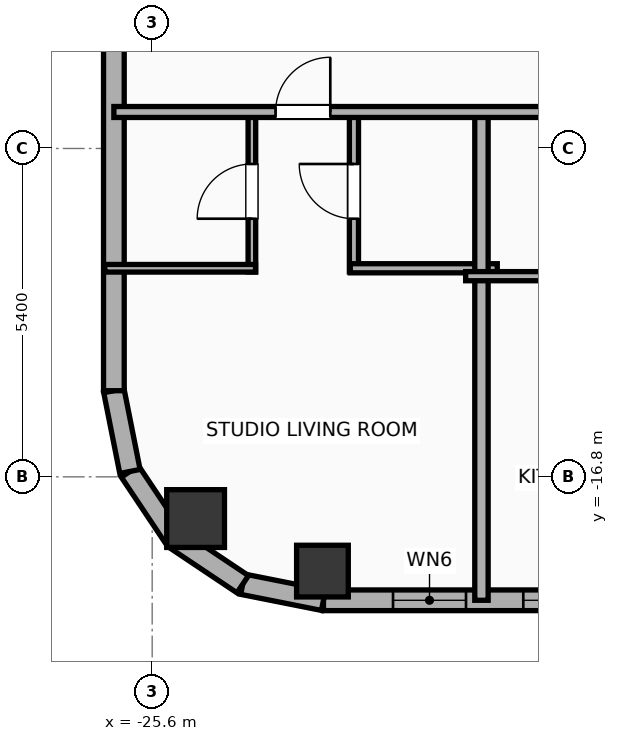
"""IFC4 building model, lengths in metres.
Left out: names, types, materials, properties, quantities, classifications, styles, units other than length and angle.
Written with IfcOpenShell. Run it as: python <this file> out.ifc"""

import sys

from ifc_helpers import new_model, si_unit, direction, frame, frame_2d, origin, origin_2d, place, context, subcontext, project, spatial, rectangle, hollow_rectangle, hollow_circle, extrude, element, fill, save


model = new_model("IFC4")
c1 = context("Model", 3, precision=1e-05, world=origin(), true_north=direction((0.0, 1.0)))
c2 = subcontext(c1, "Body", "Model", "MODEL_VIEW")
j1 = project(units=[si_unit("LENGTHUNIT", "METRE"), si_unit("PLANEANGLEUNIT", "RADIAN")], contexts=[c1])
p1 = place(None, origin())
s1 = spatial("IfcSite", under=j1, at=p1, CompositionType="ELEMENT")
p2 = place(p1, origin())
s2 = spatial("IfcBuilding", under=s1, at=p2, CompositionType="ELEMENT")
p3 = place(p2, frame((0.0, 0.0, 219.7)))
s3 = spatial("IfcBuildingStorey", under=s2, at=p3, CompositionType="ELEMENT", Elevation=219.7)
p4 = place(p3, frame((-22.8, -18.35, 0.0), z_axis=(0.0, 0.0, 1.0), x_axis=(1.0, 0.0, 0.0)))
e1 = element("IfcColumn", 1, at=p4, inside=s3, PredefinedType="COLUMN", context=c2, shape_type="SweptSolid", body=[
    extrude(hollow_rectangle(XDim=0.85, YDim=0.85, WallThickness=0.028, at=origin_2d()), origin(), (0.0, 0.0, 1.0), 3.9),
])
p5 = place(p3, frame((-24.886, -17.486, 0.0), z_axis=(0.0, 0.0, 1.0), x_axis=(1.0, 0.0, 0.0)))
e2 = element("IfcColumn", 2, at=p5, inside=s3, PredefinedType="COLUMN", context=c2, shape_type="SweptSolid", body=[
    extrude(hollow_circle(Radius=0.475, WallThickness=0.032, at=origin_2d()), origin(), (0.0, 0.0, 1.0), 3.9),
])
p6 = place(p3, frame((26.783, -18.83, 0.0), z_axis=(0.0, 0.0, 1.0), x_axis=(-1.0, 0.0, 0.0)))
e3 = element("IfcWall", 3, at=p6, inside=s3, PredefinedType="ELEMENTEDWALL", context=c2, shape_type="SweptSolid", body=[
    extrude(rectangle(XDim=49.566, YDim=0.34, at=frame_2d((24.783, 0.0))), origin(), (0.0, 0.0, 1.0), 3.65),
])
p7 = place(p6, frame((23.583, 0.0, 0.75)))
e4 = element("IfcOpeningElement", 4, at=p7, cuts=e3, PredefinedType="OPENING", context=c2, shape_type="SweptSolid", body=[
    extrude(rectangle(XDim=2.4, YDim=2.1, at=frame_2d((1.2, 1.05))), frame((0.0, 0.18, 0.0), z_axis=(0.0, -1.0, 0.0), x_axis=(1.0, 0.0, 0.0)), (0.0, 0.0, 1.0), 0.36),
])
p8 = place(p6, frame((41.756, 0.0, 0.75)))
e5 = element("IfcOpeningElement", 5, at=p8, cuts=e3, PredefinedType="OPENING", context=c2, shape_type="SweptSolid", body=[
    extrude(rectangle(XDim=2.4, YDim=2.1, at=frame_2d((1.2, 1.05))), frame((0.0, 0.18, 0.0), z_axis=(0.0, -1.0, 0.0), x_axis=(1.0, 0.0, 0.0)), (0.0, 0.0, 1.0), 0.36),
])
p9 = place(p6, frame((47.222, 0.0, 0.75)))
e6 = element("IfcOpeningElement", 6, at=p9, cuts=e3, PredefinedType="OPENING", context=c2, shape_type="SweptSolid", body=[
    extrude(rectangle(XDim=1.2, YDim=2.05, at=frame_2d((0.6, 1.025))), frame((0.0, 0.18, 0.0), z_axis=(0.0, -1.0, 0.0), x_axis=(1.0, 0.0, 0.0)), (0.0, 0.0, 1.0), 0.36),
])
p10 = place(p6, frame((45.08, 0.0, 0.75)))
e7 = element("IfcOpeningElement", 7, at=p10, cuts=e3, PredefinedType="OPENING", context=c2, shape_type="SweptSolid", body=[
    extrude(rectangle(XDim=1.2, YDim=2.05, at=frame_2d((0.6, 1.025))), frame((0.0, 0.18, 0.0), z_axis=(0.0, -1.0, 0.0), x_axis=(1.0, 0.0, 0.0)), (0.0, 0.0, 1.0), 0.36),
])
p11 = place(p6, frame((37.289, 0.0, 0.75)))
e8 = element("IfcOpeningElement", 8, at=p11, cuts=e3, PredefinedType="OPENING", context=c2, shape_type="SweptSolid", body=[
    extrude(rectangle(XDim=1.2, YDim=2.05, at=frame_2d((0.6, 1.025))), frame((0.0, 0.18, 0.0), z_axis=(0.0, -1.0, 0.0), x_axis=(1.0, 0.0, 0.0)), (0.0, 0.0, 1.0), 0.36),
])
p12 = place(p6, frame((16.115, 0.0, 0.75)))
e9 = element("IfcOpeningElement", 9, at=p12, cuts=e3, PredefinedType="OPENING", context=c2, shape_type="SweptSolid", body=[
    extrude(rectangle(XDim=1.2, YDim=2.05, at=frame_2d((0.6, 1.025))), frame((0.0, 0.18, 0.0), z_axis=(0.0, -1.0, 0.0), x_axis=(1.0, 0.0, 0.0)), (0.0, 0.0, 1.0), 0.36),
])
p13 = place(p6, frame((12.422, 0.0, 0.75)))
e10 = element("IfcOpeningElement", 10, at=p13, cuts=e3, PredefinedType="OPENING", context=c2, shape_type="SweptSolid", body=[
    extrude(rectangle(XDim=1.2, YDim=2.05, at=frame_2d((0.6, 1.025))), frame((0.0, 0.18, 0.0), z_axis=(0.0, -1.0, 0.0), x_axis=(1.0, 0.0, 0.0)), (0.0, 0.0, 1.0), 0.36),
])
p14 = place(p6, frame((8.09, 0.0, 0.75)))
e11 = element("IfcOpeningElement", 11, at=p14, cuts=e3, PredefinedType="OPENING", context=c2, shape_type="SweptSolid", body=[
    extrude(rectangle(XDim=1.2, YDim=2.05, at=frame_2d((0.6, 1.025))), frame((0.0, 0.18, 0.0), z_axis=(0.0, -1.0, 0.0), x_axis=(1.0, 0.0, 0.0)), (0.0, 0.0, 1.0), 0.36),
])
p15 = place(p6, frame((4.637, 0.0, 0.75)))
e12 = element("IfcOpeningElement", 12, at=p15, cuts=e3, PredefinedType="OPENING", context=c2, shape_type="SweptSolid", body=[
    extrude(rectangle(XDim=1.2, YDim=2.05, at=frame_2d((0.6, 1.025))), frame((0.0, 0.18, 0.0), z_axis=(0.0, -1.0, 0.0), x_axis=(1.0, 0.0, 0.0)), (0.0, 0.0, 1.0), 0.36),
])
p16 = place(p6, frame((1.811, 0.0, 0.75)))
e13 = element("IfcOpeningElement", 13, at=p16, cuts=e3, PredefinedType="OPENING", context=c2, shape_type="SweptSolid", body=[
    extrude(rectangle(XDim=1.2, YDim=2.05, at=frame_2d((0.6, 1.025))), frame((0.0, 0.18, 0.0), z_axis=(0.0, -1.0, 0.0), x_axis=(1.0, 0.0, 0.0)), (0.0, 0.0, 1.0), 0.36),
])
p17 = place(p6, frame((32.253, 0.0, 0.75)))
e14 = element("IfcOpeningElement", 14, at=p17, cuts=e3, PredefinedType="OPENING", context=c2, shape_type="SweptSolid", body=[
    extrude(rectangle(XDim=1.2, YDim=2.05, at=frame_2d((0.6, 1.025))), frame((0.0, 0.18, 0.0), z_axis=(0.0, -1.0, 0.0), x_axis=(1.0, 0.0, 0.0)), (0.0, 0.0, 1.0), 0.36),
])
p18 = place(p6, frame((27.853, 0.0, 0.75)))
e15 = element("IfcOpeningElement", 15, at=p18, cuts=e3, PredefinedType="OPENING", context=c2, shape_type="SweptSolid", body=[
    extrude(rectangle(XDim=1.2, YDim=2.05, at=frame_2d((0.6, 1.025))), frame((0.0, 0.18, 0.0), z_axis=(0.0, -1.0, 0.0), x_axis=(1.0, 0.0, 0.0)), (0.0, 0.0, 1.0), 0.36),
])
p19 = place(p6, frame((20.473, 0.0, 0.75)))
e16 = element("IfcOpeningElement", 16, at=p19, cuts=e3, PredefinedType="OPENING", context=c2, shape_type="SweptSolid", body=[
    extrude(rectangle(XDim=1.2, YDim=2.05, at=frame_2d((0.6, 1.025))), frame((0.0, 0.18, 0.0), z_axis=(0.0, -1.0, 0.0), x_axis=(1.0, 0.0, 0.0)), (0.0, 0.0, 1.0), 0.36),
])
p20 = place(p3, frame((-22.783, -18.83, 0.0), z_axis=(0.0, 0.0, 1.0), x_axis=(-0.980788153188, 0.195075878998, 0.0)))
e17 = element("IfcWall", 17, at=p20, inside=s3, PredefinedType="ELEMENTEDWALL", context=c2, shape_type="SweptSolid", body=[
    extrude(rectangle(XDim=1.354, YDim=0.34, at=frame_2d((0.677, 0.0))), origin(), (0.0, 0.0, 1.0), 3.65),
])
p21 = place(p3, frame((-24.111, -18.566, 0.0), z_axis=(0.0, 0.0, 1.0), x_axis=(-0.831403586725, 0.555669034571, 0.0)))
e18 = element("IfcWall", 18, at=p21, inside=s3, PredefinedType="ELEMENTEDWALL", context=c2, shape_type="SweptSolid", body=[
    extrude(rectangle(XDim=1.337, YDim=0.34, at=frame_2d((0.668, 0.0))), origin(), (0.0, 0.0, 1.0), 3.65),
])
p22 = place(p3, frame((-25.223, -17.823, 0.0), z_axis=(0.0, 0.0, 1.0), x_axis=(-0.555584683399, 0.831459956686, 0.0)))
e19 = element("IfcWall", 19, at=p22, inside=s3, PredefinedType="ELEMENTEDWALL", context=c2, shape_type="SweptSolid", body=[
    extrude(rectangle(XDim=1.337, YDim=0.34, at=frame_2d((0.668, 0.0))), origin(), (0.0, 0.0, 1.0), 3.65),
])
p23 = place(p3, frame((-25.966, -16.711, 0.0), z_axis=(0.0, 0.0, 1.0), x_axis=(-0.195110379894, 0.98078129043, 0.0)))
e20 = element("IfcWall", 20, at=p23, inside=s3, PredefinedType="ELEMENTEDWALL", context=c2, shape_type="SweptSolid", body=[
    extrude(rectangle(XDim=1.354, YDim=0.34, at=frame_2d((0.677, 0.0))), origin(), (0.0, 0.0, 1.0), 3.65),
])
p24 = place(p3, frame((-26.23, -15.383, 0.0), z_axis=(0.0, 0.0, 1.0), x_axis=(0.0, 1.0, 0.0)))
e21 = element("IfcWall", 21, at=p24, inside=s3, PredefinedType="ELEMENTEDWALL", context=c2, shape_type="SweptSolid", body=[
    extrude(rectangle(XDim=31.967, YDim=0.34, at=frame_2d((15.983, 0.0))), origin(), (0.0, 0.0, 1.0), 3.65),
])
p25 = place(p24, frame((29.55, 0.0, 0.75)))
e22 = element("IfcOpeningElement", 22, at=p25, cuts=e21, PredefinedType="OPENING", context=c2, shape_type="SweptSolid", body=[
    extrude(rectangle(XDim=1.2, YDim=2.05, at=frame_2d((0.6, 1.025))), frame((0.0, 0.18, 0.0), z_axis=(0.0, -1.0, 0.0), x_axis=(1.0, 0.0, 0.0)), (0.0, 0.0, 1.0), 0.36),
])
p26 = place(p24, frame((20.778, 0.0, 0.75)))
e23 = element("IfcOpeningElement", 23, at=p26, cuts=e21, PredefinedType="OPENING", context=c2, shape_type="SweptSolid", body=[
    extrude(rectangle(XDim=1.2, YDim=2.05, at=frame_2d((0.6, 1.025))), frame((0.0, 0.18, 0.0), z_axis=(0.0, -1.0, 0.0), x_axis=(1.0, 0.0, 0.0)), (0.0, 0.0, 1.0), 0.36),
])
p27 = place(p24, frame((7.323, 0.0, 0.75)))
e24 = element("IfcOpeningElement", 24, at=p27, cuts=e21, PredefinedType="OPENING", context=c2, shape_type="SweptSolid", body=[
    extrude(rectangle(XDim=1.2, YDim=2.05, at=frame_2d((0.6, 1.025))), frame((0.0, 0.18, 0.0), z_axis=(0.0, -1.0, 0.0), x_axis=(1.0, 0.0, 0.0)), (0.0, 0.0, 1.0), 0.36),
])
p28 = place(p3, frame((-23.96, -13.43, 0.0), z_axis=(0.0, 0.0, 1.0), x_axis=(0.0, 1.0, 0.0)))
e25 = element("IfcWall", 25, at=p28, inside=s3, PredefinedType="PARTITIONING", context=c2, shape_type="SweptSolid", body=[
    extrude(rectangle(XDim=2.65, YDim=0.125, at=frame_2d((1.325, 0.0))), origin(), (0.0, 0.0, 1.0), 3.65),
])
p29 = place(p28, frame((0.875, 0.0, 0.0)))
e26 = element("IfcOpeningElement", 26, at=p29, cuts=e25, PredefinedType="OPENING", context=c2, shape_type="SweptSolid", body=[
    extrude(rectangle(XDim=0.9, YDim=2.05, at=frame_2d((0.45, 1.025))), frame((0.0, 0.073, 0.0), z_axis=(0.0, -1.0, 0.0), x_axis=(1.0, 0.0, 0.0)), (0.0, 0.0, 1.0), 0.145),
])
p30 = place(p3, frame((-22.282, -13.43, 0.0), z_axis=(0.0, 0.0, 1.0), x_axis=(0.0, 1.0, 0.0)))
e27 = element("IfcWall", 27, at=p30, inside=s3, PredefinedType="PLUMBINGWALL", context=c2, shape_type="SweptSolid", body=[
    extrude(rectangle(XDim=2.65, YDim=0.15, at=frame_2d((1.325, 0.0))), origin(), (0.0, 0.0, 1.0), 3.65),
])
p31 = place(p30, frame((0.875, 0.0, 0.0)))
e28 = element("IfcOpeningElement", 28, at=p31, cuts=e27, PredefinedType="OPENING", context=c2, shape_type="SweptSolid", body=[
    extrude(rectangle(XDim=0.9, YDim=2.05, at=frame_2d((0.45, 1.025))), frame((0.0, 0.085, 0.0), z_axis=(0.0, -1.0, 0.0), x_axis=(1.0, 0.0, 0.0)), (0.0, 0.0, 1.0), 0.17),
])
p32 = place(p3, frame((-26.38, -13.37, 0.0), z_axis=(0.0, 0.0, 1.0), x_axis=(1.0, 0.0, 0.0)))
e29 = element("IfcWall", 29, at=p32, inside=s3, PredefinedType="PARTITIONING", context=c2, shape_type="SweptSolid", body=[
    extrude(rectangle(XDim=2.48, YDim=0.125, at=frame_2d((1.24, 0.0))), origin(), (0.0, 0.0, 1.0), 3.65),
])
p33 = place(p3, frame((-22.342, -13.37, 0.0), z_axis=(0.0, 0.0, 1.0), x_axis=(1.0, 0.0, 0.0)))
e30 = element("IfcWall", 30, at=p33, inside=s3, PredefinedType="PLUMBINGWALL", context=c2, shape_type="SweptSolid", body=[
    extrude(rectangle(XDim=2.417, YDim=0.15, at=frame_2d((1.208, 0.0))), origin(), (0.0, 0.0, 1.0), 3.65),
])
p34 = place(p3, frame((-20.185, -18.83, 0.0), z_axis=(0.0, 0.0, 1.0), x_axis=(0.0, 1.0, 0.0)))
e31 = element("IfcWall", 31, at=p34, inside=s3, PredefinedType="PARTITIONING", context=c2, shape_type="SweptSolid", body=[
    extrude(rectangle(XDim=8.11, YDim=0.22, at=frame_2d((4.055, 0.0))), origin(), (0.0, 0.0, 1.0), 3.09),
])
p35 = place(p3, frame((-20.445, -13.5, 0.0), z_axis=(0.0, 0.0, 1.0), x_axis=(1.0, 0.0, 0.0)))
e32 = element("IfcWall", 32, at=p35, inside=s3, PredefinedType="PLUMBINGWALL", context=c2, shape_type="SweptSolid", body=[
    extrude(rectangle(XDim=2.916, YDim=0.15, at=frame_2d((1.458, 0.0))), origin(), (0.0, 0.0, 1.0), 3.65),
])
p36 = place(p3, frame((-26.23, -10.8, 0.0), z_axis=(0.0, 0.0, 1.0), x_axis=(1.0, 0.0, 0.0)))
e33 = element("IfcWall", 33, at=p36, inside=s3, PredefinedType="PARTITIONING", context=c2, shape_type="SweptSolid", body=[
    extrude(rectangle(XDim=18.15, YDim=0.18, at=frame_2d((9.075, 0.0))), origin(), (0.0, 0.0, 1.0), 3.65),
])
p37 = place(p36, frame((2.659, 0.0, 0.0)))
e34 = element("IfcOpeningElement", 34, at=p37, cuts=e33, PredefinedType="OPENING", context=c2, shape_type="SweptSolid", body=[
    extrude(rectangle(XDim=0.9, YDim=2.05, at=frame_2d((0.45, 1.025))), frame((0.0, 0.1, 0.0), z_axis=(0.0, -1.0, 0.0), x_axis=(1.0, 0.0, 0.0)), (0.0, 0.0, 1.0), 0.2),
])
p38 = place(p36, frame((9.754, 0.0, 0.0)))
e35 = element("IfcOpeningElement", 35, at=p38, cuts=e33, PredefinedType="OPENING", context=c2, shape_type="SweptSolid", body=[
    extrude(rectangle(XDim=1.15, YDim=2.05, at=frame_2d((0.575, 1.025))), frame((0.0, 0.1, 0.0), z_axis=(0.0, -1.0, 0.0), x_axis=(1.0, 0.0, 0.0)), (0.0, 0.0, 1.0), 0.2),
])
p39 = place(p36, frame((14.792, 0.0, 0.0)))
e36 = element("IfcOpeningElement", 36, at=p39, cuts=e33, PredefinedType="OPENING", context=c2, shape_type="SweptSolid", body=[
    extrude(rectangle(XDim=0.9, YDim=2.05, at=frame_2d((0.45, 1.025))), frame((0.0, 0.1, 0.0), z_axis=(0.0, -1.0, 0.0), x_axis=(1.0, 0.0, 0.0)), (0.0, 0.0, 1.0), 0.2),
])
p40 = place(p9, origin())
e37 = element("IfcWindow", 37, at=p40, inside=s3, PartitioningType="SINGLE_PANEL", PredefinedType="WINDOW", context=c2, shape_type="SweptSolid", body=[
    extrude(rectangle(XDim=1.2, YDim=2.05, at=frame_2d((0.6, 1.025))), frame((0.0, 0.03, 0.0), z_axis=(0.0, -1.0, 0.0), x_axis=(1.0, 0.0, 0.0)), (0.0, 0.0, 1.0), 0.06),
])
fill(e6, e37)
p41 = place(p10, origin())
e38 = element("IfcWindow", 38, at=p41, inside=s3, PartitioningType="SINGLE_PANEL", PredefinedType="WINDOW", context=c2, shape_type="SweptSolid", body=[
    extrude(rectangle(XDim=1.2, YDim=2.05, at=frame_2d((0.6, 1.025))), frame((0.0, 0.03, 0.0), z_axis=(0.0, -1.0, 0.0), x_axis=(1.0, 0.0, 0.0)), (0.0, 0.0, 1.0), 0.06),
])
fill(e7, e38)
p42 = place(p29, origin())
e39 = element("IfcDoor", 39, at=p42, inside=s3, OperationType="SINGLE_SWING_LEFT", PredefinedType="DOOR", context=c2, shape_type="SweptSolid", body=[
    extrude(rectangle(XDim=0.9, YDim=2.05, at=frame_2d((0.45, 1.025))), frame((0.0, 0.025, 0.0), z_axis=(0.0, -1.0, 0.0), x_axis=(1.0, 0.0, 0.0)), (0.0, 0.0, 1.0), 0.05),
])
fill(e26, e39)
p43 = place(p31, origin())
e40 = element("IfcDoor", 40, at=p43, inside=s3, OperationType="SINGLE_SWING_RIGHT", PredefinedType="DOOR", context=c2, shape_type="SweptSolid", body=[
    extrude(rectangle(XDim=0.9, YDim=2.05, at=frame_2d((0.45, 1.025))), frame((0.0, 0.025, 0.0), z_axis=(0.0, -1.0, 0.0), x_axis=(1.0, 0.0, 0.0)), (0.0, 0.0, 1.0), 0.05),
])
fill(e28, e40)
p44 = place(p37, origin())
e41 = element("IfcDoor", 41, at=p44, inside=s3, OperationType="SINGLE_SWING_RIGHT", PredefinedType="DOOR", context=c2, shape_type="SweptSolid", body=[
    extrude(rectangle(XDim=0.9, YDim=2.05, at=frame_2d((0.45, 1.025))), frame((0.0, 0.025, 0.0), z_axis=(0.0, -1.0, 0.0), x_axis=(1.0, 0.0, 0.0)), (0.0, 0.0, 1.0), 0.05),
])
fill(e34, e41)
save(model, sys.argv[1])
